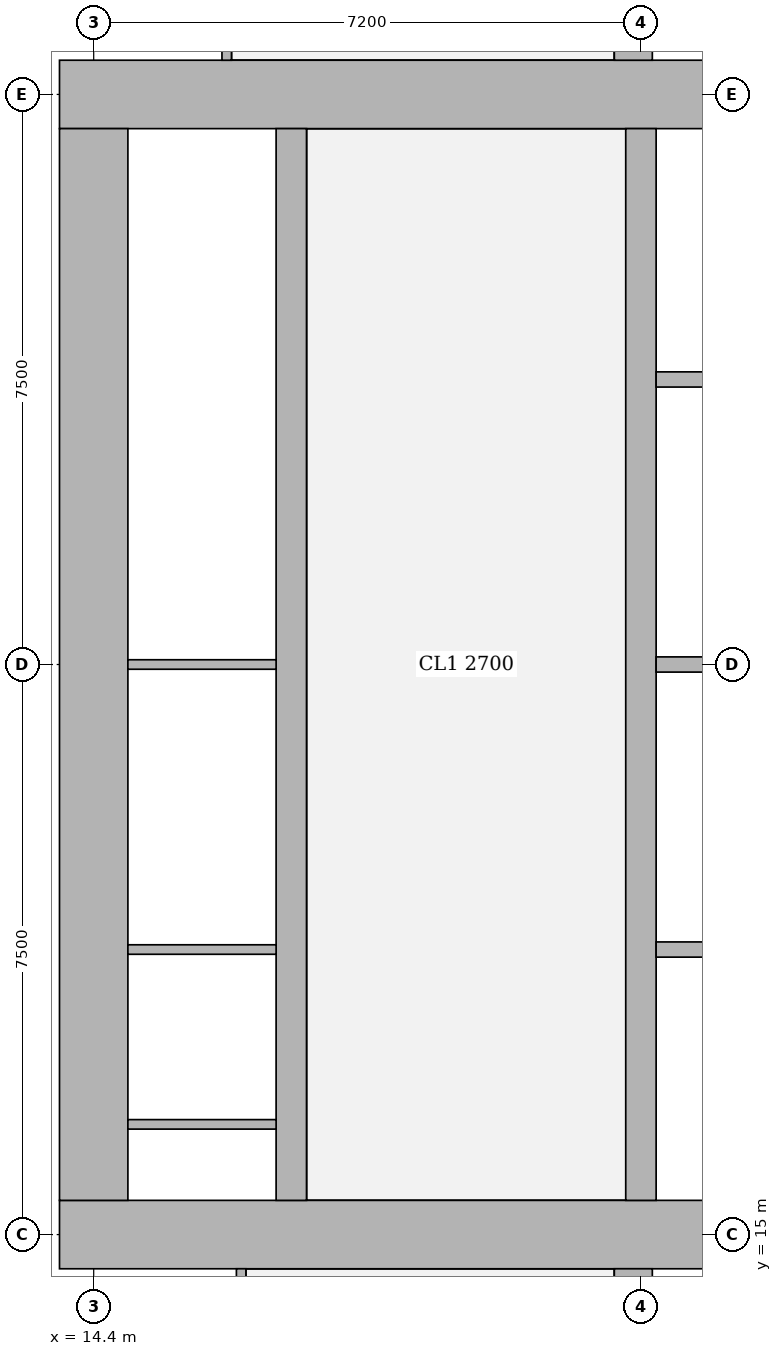
"""IFC4 building model, lengths in metres.
Left out: names, types, materials, properties, quantities, classifications, styles, units other than length and angle.
Written with IfcOpenShell. Run it as: python <this file> out.ifc"""

import sys

from ifc_helpers import new_model, si_unit, direction, frame, frame_2d, origin, place, context, subcontext, project, spatial, rectangle, extrude, element, fill, save


model = new_model("IFC4")
c1 = context("Model", 3, precision=1e-05, world=origin(), true_north=direction((0.0, 1.0)))
c2 = subcontext(c1, "Body", "Model", "MODEL_VIEW")
j1 = project(units=[si_unit("LENGTHUNIT", "METRE"), si_unit("PLANEANGLEUNIT", "RADIAN")], contexts=[c1])
p1 = place(None, origin())
s1 = spatial("IfcSite", under=j1, at=p1, CompositionType="ELEMENT")
p2 = place(p1, origin())
s2 = spatial("IfcBuilding", under=s1, at=p2, CompositionType="ELEMENT")
p3 = place(p2, frame((0.0, 0.0, 251.6)))
s3 = spatial("IfcBuildingStorey", under=s2, at=p3, CompositionType="ELEMENT", Elevation=251.6)
p4 = place(p3, frame((13.95, 15.0, 0.0), z_axis=(0.0, 0.0, 1.0), x_axis=(1.0, 0.0, 0.0)))
e1 = element("IfcWall", 1, at=p4, inside=s3, PredefinedType="SHEAR", context=c2, shape_type="SweptSolid", body=[
    extrude(rectangle(XDim=15.3, YDim=0.9, at=frame_2d((7.65, 0.0))), origin(), (0.0, 0.0, 1.0), 3.75),
])
p5 = place(p4, frame((4.45, 0.0, 0.0)))
e2 = element("IfcOpeningElement", 2, at=p5, cuts=e1, PredefinedType="OPENING", context=c2, shape_type="SweptSolid", body=[
    extrude(rectangle(XDim=1.8, YDim=2.1, at=frame_2d((0.9, 1.05))), frame((0.0, 0.46, 0.0), z_axis=(0.0, -1.0, 0.0), x_axis=(1.0, 0.0, 0.0)), (0.0, 0.0, 1.0), 0.92),
])
p6 = place(p4, frame((10.7, 0.0, 0.0)))
e3 = element("IfcOpeningElement", 3, at=p6, cuts=e1, PredefinedType="OPENING", context=c2, shape_type="SweptSolid", body=[
    extrude(rectangle(XDim=1.1, YDim=2.1, at=frame_2d((0.55, 1.05))), frame((0.0, 0.46, 0.0), z_axis=(0.0, -1.0, 0.0), x_axis=(1.0, 0.0, 0.0)), (0.0, 0.0, 1.0), 0.92),
])
p7 = place(p3, frame((13.95, 30.0, 0.0), z_axis=(0.0, 0.0, 1.0), x_axis=(1.0, 0.0, 0.0)))
e4 = element("IfcWall", 4, at=p7, inside=s3, PredefinedType="SHEAR", context=c2, shape_type="SweptSolid", body=[
    extrude(rectangle(XDim=15.3, YDim=0.9, at=frame_2d((7.65, 0.0))), origin(), (0.0, 0.0, 1.0), 3.75),
])
p8 = place(p7, frame((4.45, 0.0, 0.0)))
e5 = element("IfcOpeningElement", 5, at=p8, cuts=e4, PredefinedType="OPENING", context=c2, shape_type="SweptSolid", body=[
    extrude(rectangle(XDim=1.8, YDim=2.1, at=frame_2d((0.9, 1.05))), frame((0.0, 0.46, 0.0), z_axis=(0.0, -1.0, 0.0), x_axis=(1.0, 0.0, 0.0)), (0.0, 0.0, 1.0), 0.92),
])
p9 = place(p7, frame((10.7, 0.0, 0.0)))
e6 = element("IfcOpeningElement", 6, at=p9, cuts=e4, PredefinedType="OPENING", context=c2, shape_type="SweptSolid", body=[
    extrude(rectangle(XDim=1.1, YDim=2.1, at=frame_2d((0.55, 1.05))), frame((0.0, 0.46, 0.0), z_axis=(0.0, -1.0, 0.0), x_axis=(1.0, 0.0, 0.0)), (0.0, 0.0, 1.0), 0.92),
])
p10 = place(p3, frame((14.4, 15.45, 0.0), z_axis=(0.0, 0.0, 1.0), x_axis=(0.0, 1.0, 0.0)))
e7 = element("IfcWall", 7, at=p10, inside=s3, PredefinedType="SHEAR", context=c2, shape_type="SweptSolid", body=[
    extrude(rectangle(XDim=14.1, YDim=0.9, at=frame_2d((7.05, 0.0))), origin(), (0.0, 0.0, 1.0), 3.75),
])
p11 = place(p3, frame((17.0, 15.45, 0.0), z_axis=(0.0, 0.0, 1.0), x_axis=(0.0, 1.0, 0.0)))
e8 = element("IfcWall", 8, at=p11, inside=s3, PredefinedType="SHEAR", context=c2, shape_type="SweptSolid", body=[
    extrude(rectangle(XDim=14.1, YDim=0.4, at=frame_2d((7.05, 0.0))), origin(), (0.0, 0.0, 1.0), 3.75),
])
p12 = place(p11, frame((1.05, 0.0, 0.0)))
e9 = element("IfcOpeningElement", 9, at=p12, cuts=e8, PredefinedType="OPENING", context=c2, shape_type="SweptSolid", body=[
    extrude(rectangle(XDim=1.0, YDim=2.1, at=frame_2d((0.5, 1.05))), frame((0.0, 0.21, 0.0), z_axis=(0.0, -1.0, 0.0), x_axis=(1.0, 0.0, 0.0)), (0.0, 0.0, 1.0), 0.42),
])
p13 = place(p11, frame((4.675, 0.0, 0.0)))
e10 = element("IfcOpeningElement", 10, at=p13, cuts=e8, PredefinedType="OPENING", context=c2, shape_type="SweptSolid", body=[
    extrude(rectangle(XDim=1.0, YDim=2.1, at=frame_2d((0.5, 1.05))), frame((0.0, 0.21, 0.0), z_axis=(0.0, -1.0, 0.0), x_axis=(1.0, 0.0, 0.0)), (0.0, 0.0, 1.0), 0.42),
])
p14 = place(p11, frame((8.425, 0.0, 0.0)))
e11 = element("IfcOpeningElement", 11, at=p14, cuts=e8, PredefinedType="OPENING", context=c2, shape_type="SweptSolid", body=[
    extrude(rectangle(XDim=1.0, YDim=2.1, at=frame_2d((0.5, 1.05))), frame((0.0, 0.21, 0.0), z_axis=(0.0, -1.0, 0.0), x_axis=(1.0, 0.0, 0.0)), (0.0, 0.0, 1.0), 0.42),
])
p15 = place(p11, frame((12.175, 0.0, 0.0)))
e12 = element("IfcOpeningElement", 12, at=p15, cuts=e8, PredefinedType="OPENING", context=c2, shape_type="SweptSolid", body=[
    extrude(rectangle(XDim=1.0, YDim=2.1, at=frame_2d((0.5, 1.05))), frame((0.0, 0.21, 0.0), z_axis=(0.0, -1.0, 0.0), x_axis=(1.0, 0.0, 0.0)), (0.0, 0.0, 1.0), 0.42),
])
p16 = place(p3, frame((21.6, 15.45, 0.0), z_axis=(0.0, 0.0, 1.0), x_axis=(0.0, 1.0, 0.0)))
e13 = element("IfcWall", 13, at=p16, inside=s3, PredefinedType="SHEAR", context=c2, shape_type="SweptSolid", body=[
    extrude(rectangle(XDim=14.1, YDim=0.4, at=frame_2d((7.05, 0.0))), origin(), (0.0, 0.0, 1.0), 3.75),
])
p17 = place(p16, frame((0.875, 0.0, 0.0)))
e14 = element("IfcOpeningElement", 14, at=p17, cuts=e13, PredefinedType="OPENING", context=c2, shape_type="SweptSolid", body=[
    extrude(rectangle(XDim=1.1, YDim=2.1, at=frame_2d((0.55, 1.05))), frame((0.0, 0.21, 0.0), z_axis=(0.0, -1.0, 0.0), x_axis=(1.0, 0.0, 0.0)), (0.0, 0.0, 1.0), 0.42),
])
p18 = place(p16, frame((4.625, 0.0, 0.0)))
e15 = element("IfcOpeningElement", 15, at=p18, cuts=e13, PredefinedType="OPENING", context=c2, shape_type="SweptSolid", body=[
    extrude(rectangle(XDim=1.1, YDim=2.1, at=frame_2d((0.55, 1.05))), frame((0.0, 0.21, 0.0), z_axis=(0.0, -1.0, 0.0), x_axis=(1.0, 0.0, 0.0)), (0.0, 0.0, 1.0), 0.42),
])
p19 = place(p16, frame((8.375, 0.0, 0.0)))
e16 = element("IfcOpeningElement", 16, at=p19, cuts=e13, PredefinedType="OPENING", context=c2, shape_type="SweptSolid", body=[
    extrude(rectangle(XDim=1.1, YDim=2.1, at=frame_2d((0.55, 1.05))), frame((0.0, 0.21, 0.0), z_axis=(0.0, -1.0, 0.0), x_axis=(1.0, 0.0, 0.0)), (0.0, 0.0, 1.0), 0.42),
])
p20 = place(p16, frame((12.125, 0.0, 0.0)))
e17 = element("IfcOpeningElement", 17, at=p20, cuts=e13, PredefinedType="OPENING", context=c2, shape_type="SweptSolid", body=[
    extrude(rectangle(XDim=1.1, YDim=2.1, at=frame_2d((0.55, 1.05))), frame((0.0, 0.21, 0.0), z_axis=(0.0, -1.0, 0.0), x_axis=(1.0, 0.0, 0.0)), (0.0, 0.0, 1.0), 0.42),
])
for number, where, z_axis, x_axis in (
    (18, (21.5, 10.35, 0.0), (0.0, 0.0, 1.0), (0.0, 1.0, 0.0)),
    (19, (21.5, 30.45, 0.0), (0.0, 0.0, 1.0), (0.0, 1.0, 0.0)),
):
    element("IfcWall", number, at=place(p3, frame(where, z_axis=z_axis, x_axis=x_axis)), inside=s3, PredefinedType="SHEAR", context=c2, shape_type="SweptSolid", body=[
        extrude(rectangle(XDim=4.2, YDim=0.5, at=frame_2d((2.1, 0.0))), origin(), (0.0, 0.0, 1.0), 3.75),
    ])
p21 = place(p3, frame((16.34, 10.562, 0.0), z_axis=(0.0, 0.0, 1.0), x_axis=(0.0, 1.0, 0.0)))
e20 = element("IfcWall", 20, at=p21, inside=s3, PredefinedType="PARTITIONING", context=c2, shape_type="SweptSolid", body=[
    extrude(rectangle(XDim=3.988, YDim=0.125, at=frame_2d((1.994, 0.0))), origin(), (0.0, 0.0, 1.0), 3.5),
])
p22 = place(p21, frame((1.438, 0.0, 0.0)))
e21 = element("IfcOpeningElement", 21, at=p22, cuts=e20, PredefinedType="OPENING", context=c2, shape_type="SweptSolid", body=[
    extrude(rectangle(XDim=1.0, YDim=2.1, at=frame_2d((0.5, 1.05))), frame((0.0, 0.073, 0.0), z_axis=(0.0, -1.0, 0.0), x_axis=(1.0, 0.0, 0.0)), (0.0, 0.0, 1.0), 0.145),
])
p23 = place(p3, frame((16.15, 30.45, 0.0), z_axis=(0.0, 0.0, 1.0), x_axis=(0.0, 1.0, 0.0)))
e22 = element("IfcWall", 22, at=p23, inside=s3, PredefinedType="PARTITIONING", context=c2, shape_type="SweptSolid", body=[
    extrude(rectangle(XDim=4.387, YDim=0.125, at=frame_2d((2.193, 0.0))), origin(), (0.0, 0.0, 1.0), 3.5),
])
p24 = place(p23, frame((1.75, 0.0, 0.0)))
e23 = element("IfcOpeningElement", 23, at=p24, cuts=e22, PredefinedType="OPENING", context=c2, shape_type="SweptSolid", body=[
    extrude(rectangle(XDim=1.0, YDim=2.1, at=frame_2d((0.5, 1.05))), frame((0.0, 0.073, 0.0), z_axis=(0.0, -1.0, 0.0), x_axis=(1.0, 0.0, 0.0)), (0.0, 0.0, 1.0), 0.145),
])
p25 = place(p3, frame((14.85, 16.45, 0.0), z_axis=(0.0, 0.0, 1.0), x_axis=(1.0, 0.0, 0.0)))
e24 = element("IfcWall", 24, at=p25, inside=s3, PredefinedType="PARTITIONING", context=c2, shape_type="SweptSolid", body=[
    extrude(rectangle(XDim=1.95, YDim=0.125, at=frame_2d((0.975, 0.0))), origin(), (0.0, 0.0, 1.0), 3.5),
])
p26 = place(p25, frame((0.2, 0.0, 0.0)))
e25 = element("IfcOpeningElement", 25, at=p26, cuts=e24, PredefinedType="OPENING", context=c2, shape_type="SweptSolid", body=[
    extrude(rectangle(XDim=1.0, YDim=2.1, at=frame_2d((0.5, 1.05))), frame((0.0, 0.073, 0.0), z_axis=(0.0, -1.0, 0.0), x_axis=(1.0, 0.0, 0.0)), (0.0, 0.0, 1.0), 0.145),
])
for number, where, z_axis, x_axis in (
    (26, (14.85, 18.75, 0.0), (0.0, 0.0, 1.0), (1.0, 0.0, 0.0)),
    (27, (14.85, 22.5, 0.0), (0.0, 0.0, 1.0), (1.0, 0.0, 0.0)),
):
    element("IfcWall", number, at=place(p3, frame(where, z_axis=z_axis, x_axis=x_axis)), inside=s3, PredefinedType="PARTITIONING", context=c2, shape_type="SweptSolid", body=[
        extrude(rectangle(XDim=1.95, YDim=0.125, at=frame_2d((0.975, 0.0))), origin(), (0.0, 0.0, 1.0), 3.5),
    ])
for number, where, z_axis, x_axis in (
    (28, (21.8, 18.75, 0.0), (0.0, 0.0, 1.0), (1.0, 0.0, 0.0)),
    (29, (21.8, 22.5, 0.0), (0.0, 0.0, 1.0), (1.0, 0.0, 0.0)),
    (30, (21.8, 26.25, 0.0), (0.0, 0.0, 1.0), (1.0, 0.0, 0.0)),
):
    element("IfcWall", number, at=place(p3, frame(where, z_axis=z_axis, x_axis=x_axis)), inside=s3, PredefinedType="SOLIDWALL", context=c2, shape_type="SweptSolid", body=[
        extrude(rectangle(XDim=2.2, YDim=0.2, at=frame_2d((1.1, 0.0))), origin(), (0.0, 0.0, 1.0), 3.5),
    ])
p27 = place(p26, origin())
e31 = element("IfcDoor", 31, at=p27, inside=s3, OperationType="SINGLE_SWING_RIGHT", PredefinedType="DOOR", context=c2, shape_type="SweptSolid", body=[
    extrude(rectangle(XDim=1.0, YDim=2.1, at=frame_2d((0.5, 1.05))), frame((0.0, 0.025, 0.0), z_axis=(0.0, -1.0, 0.0), x_axis=(1.0, 0.0, 0.0)), (0.0, 0.0, 1.0), 0.05),
])
fill(e25, e31)
p28 = place(p12, origin())
e32 = element("IfcDoor", 32, at=p28, inside=s3, OperationType="SINGLE_SWING_LEFT", PredefinedType="DOOR", context=c2, shape_type="SweptSolid", body=[
    extrude(rectangle(XDim=1.0, YDim=2.1, at=frame_2d((0.5, 1.05))), frame((0.0, 0.025, 0.0), z_axis=(0.0, -1.0, 0.0), x_axis=(1.0, 0.0, 0.0)), (0.0, 0.0, 1.0), 0.05),
])
fill(e9, e32)
p29 = place(p13, origin())
e33 = element("IfcDoor", 33, at=p29, inside=s3, OperationType="SINGLE_SWING_LEFT", PredefinedType="DOOR", context=c2, shape_type="SweptSolid", body=[
    extrude(rectangle(XDim=1.0, YDim=2.1, at=frame_2d((0.5, 1.05))), frame((0.0, 0.025, 0.0), z_axis=(0.0, -1.0, 0.0), x_axis=(1.0, 0.0, 0.0)), (0.0, 0.0, 1.0), 0.05),
])
fill(e10, e33)
p30 = place(p14, origin())
e34 = element("IfcDoor", 34, at=p30, inside=s3, OperationType="SINGLE_SWING_LEFT", PredefinedType="DOOR", context=c2, shape_type="SweptSolid", body=[
    extrude(rectangle(XDim=1.0, YDim=2.1, at=frame_2d((0.5, 1.05))), frame((0.0, 0.025, 0.0), z_axis=(0.0, -1.0, 0.0), x_axis=(1.0, 0.0, 0.0)), (0.0, 0.0, 1.0), 0.05),
])
fill(e11, e34)
p31 = place(p15, origin())
e35 = element("IfcDoor", 35, at=p31, inside=s3, OperationType="SINGLE_SWING_RIGHT", PredefinedType="DOOR", context=c2, shape_type="SweptSolid", body=[
    extrude(rectangle(XDim=1.0, YDim=2.1, at=frame_2d((0.5, 1.05))), frame((0.0, 0.025, 0.0), z_axis=(0.0, -1.0, 0.0), x_axis=(1.0, 0.0, 0.0)), (0.0, 0.0, 1.0), 0.05),
])
fill(e12, e35)
p32 = place(p5, origin())
e36 = element("IfcDoor", 36, at=p32, inside=s3, OperationType="DOUBLE_DOOR_SINGLE_SWING", PredefinedType="DOOR", context=c2, shape_type="SweptSolid", body=[
    extrude(rectangle(XDim=1.8, YDim=2.1, at=frame_2d((0.9, 1.05))), frame((0.0, 0.025, 0.0), z_axis=(0.0, -1.0, 0.0), x_axis=(1.0, 0.0, 0.0)), (0.0, 0.0, 1.0), 0.05),
])
fill(e2, e36)
p33 = place(p8, origin())
e37 = element("IfcDoor", 37, at=p33, inside=s3, OperationType="DOUBLE_DOOR_SINGLE_SWING", PredefinedType="DOOR", context=c2, shape_type="SweptSolid", body=[
    extrude(rectangle(XDim=1.8, YDim=2.1, at=frame_2d((0.9, 1.05))), frame((0.0, 0.025, 0.0), z_axis=(0.0, -1.0, 0.0), x_axis=(1.0, 0.0, 0.0)), (0.0, 0.0, 1.0), 0.05),
])
fill(e5, e37)
p34 = place(p17, origin())
e38 = element("IfcDoor", 38, at=p34, inside=s3, OperationType="DOUBLE_DOOR_SLIDING", PredefinedType="DOOR", context=c2, shape_type="SweptSolid", body=[
    extrude(rectangle(XDim=1.1, YDim=2.1, at=frame_2d((0.55, 1.05))), frame((0.0, 0.025, 0.0), z_axis=(0.0, -1.0, 0.0), x_axis=(1.0, 0.0, 0.0)), (0.0, 0.0, 1.0), 0.05),
])
fill(e14, e38)
p35 = place(p18, origin())
e39 = element("IfcDoor", 39, at=p35, inside=s3, OperationType="DOUBLE_DOOR_SLIDING", PredefinedType="DOOR", context=c2, shape_type="SweptSolid", body=[
    extrude(rectangle(XDim=1.1, YDim=2.1, at=frame_2d((0.55, 1.05))), frame((0.0, 0.025, 0.0), z_axis=(0.0, -1.0, 0.0), x_axis=(1.0, 0.0, 0.0)), (0.0, 0.0, 1.0), 0.05),
])
fill(e15, e39)
p36 = place(p19, origin())
e40 = element("IfcDoor", 40, at=p36, inside=s3, OperationType="DOUBLE_DOOR_SLIDING", PredefinedType="DOOR", context=c2, shape_type="SweptSolid", body=[
    extrude(rectangle(XDim=1.1, YDim=2.1, at=frame_2d((0.55, 1.05))), frame((0.0, 0.025, 0.0), z_axis=(0.0, -1.0, 0.0), x_axis=(1.0, 0.0, 0.0)), (0.0, 0.0, 1.0), 0.05),
])
fill(e16, e40)
p37 = place(p20, origin())
e41 = element("IfcDoor", 41, at=p37, inside=s3, OperationType="DOUBLE_DOOR_SLIDING", PredefinedType="DOOR", context=c2, shape_type="SweptSolid", body=[
    extrude(rectangle(XDim=1.1, YDim=2.1, at=frame_2d((0.55, 1.05))), frame((0.0, 0.025, 0.0), z_axis=(0.0, -1.0, 0.0), x_axis=(1.0, 0.0, 0.0)), (0.0, 0.0, 1.0), 0.05),
])
fill(e17, e41)
save(model, sys.argv[1])
